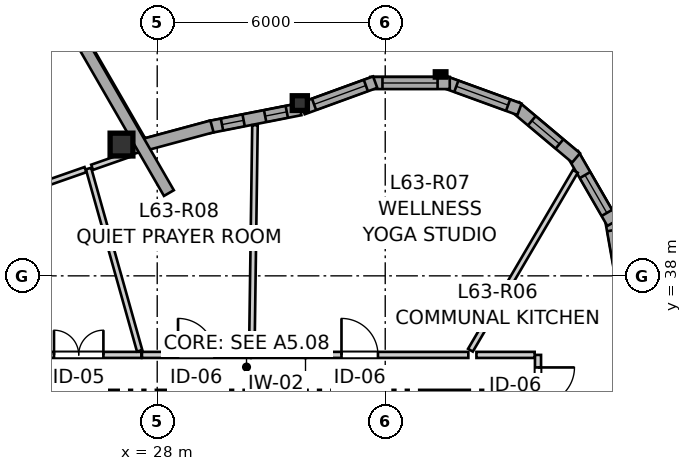
"""IFC4 building model, lengths in metres.
Left out: names, types, materials, properties, quantities, classifications, styles, units other than length and angle.
Written with IfcOpenShell. Run it as: python <this file> out.ifc"""

import sys

from ifc_helpers import new_model, si_unit, direction, frame, frame_2d, origin, origin_2d, place, context, subcontext, project, spatial, rectangle, i_section, extrude, source, transform, mapped, element, fill, save


model = new_model("IFC4")
c1 = context("Model", 3, precision=1e-05, world=origin(), true_north=direction((0.0, 1.0)))
c2 = subcontext(c1, "Body", "Model", "MODEL_VIEW")
j1 = project(units=[si_unit("LENGTHUNIT", "METRE"), si_unit("PLANEANGLEUNIT", "RADIAN")], contexts=[c1])
p1 = place(None, origin())
s1 = spatial("IfcSite", under=j1, at=p1, CompositionType="ELEMENT")
p2 = place(p1, origin())
s2 = spatial("IfcBuilding", under=s1, at=p2, CompositionType="ELEMENT")
p3 = place(p2, frame((0.0, 0.0, 211.6)))
s3 = spatial("IfcBuildingStorey", under=s2, at=p3, CompositionType="ELEMENT", Elevation=211.6)
m1 = source(origin(), c2, "Body", "SweptSolid", [
    extrude(i_section(OverallWidth=0.398, OverallDepth=0.387, WebThickness=0.019, FlangeThickness=0.03, FilletRadius=0.015, at=origin_2d()), origin(), (0.0, 0.0, 1.0), 2.96),
])
p4 = place(p3, frame((31.752, 42.545, 0.0), z_axis=(0.0, 0.0, 1.0), x_axis=(1.0, 0.0, 0.0)))
e1 = element("IfcColumn", 1, at=p4, inside=s3, PredefinedType="PILASTER", context=c2, shape_type="MappedRepresentation", body=[
    mapped(m1, transform((0.0, 0.0, 0.0), x_axis=(1.0, 0.0, 0.0), y_axis=(0.0, 1.0, 0.0), z_axis=(0.0, 0.0, 1.0), scale=1.0)),
])
m2 = source(origin(), c2, "Body", "SweptSolid", [
    extrude(rectangle(XDim=0.6, YDim=0.6, at=origin_2d()), origin(), (0.0, 0.0, 1.0), 2.96),
])
p5 = place(p3, frame((27.06, 41.454, 0.0), z_axis=(0.0, 0.0, 1.0), x_axis=(1.0, 0.0, 0.0)))
e2 = element("IfcColumn", 2, at=p5, inside=s3, PredefinedType="COLUMN", context=c2, shape_type="MappedRepresentation", body=[
    mapped(m2, transform((0.0, 0.0, 0.0), x_axis=(1.0, 0.0, 0.0), y_axis=(0.0, 1.0, 0.0), z_axis=(0.0, 0.0, 1.0), scale=1.0)),
])
p6 = place(p3, frame((40.279, 37.583, 0.0), z_axis=(0.0, 0.0, 1.0), x_axis=(-0.173671780312, 0.984803590937, 0.0)))
e3 = element("IfcWall", 3, at=p6, inside=s3, PredefinedType="SOLIDWALL", context=c2, shape_type="SweptSolid", body=[
    extrude(rectangle(XDim=1.962, YDim=0.32, at=frame_2d((0.981, 0.0))), origin(), (0.0, 0.0, 1.0), 2.58),
])
p7 = place(p6, frame((0.391, 0.0, 0.82)))
e4 = element("IfcOpeningElement", 4, at=p7, cuts=e3, PredefinedType="OPENING", context=c2, shape_type="SweptSolid", body=[
    extrude(rectangle(XDim=1.25, YDim=1.35, at=frame_2d((0.625, 0.675))), frame((0.0, 0.17, 0.0), z_axis=(0.0, -1.0, 0.0), x_axis=(1.0, 0.0, 0.0)), (0.0, 0.0, 1.0), 0.34),
])
p8 = place(p3, frame((39.983, 39.393, 0.0), z_axis=(0.0, 0.0, 1.0), x_axis=(-0.499995423472, 0.866028046028, 0.0)))
e5 = element("IfcWall", 5, at=p8, inside=s3, PredefinedType="SOLIDWALL", context=c2, shape_type="SweptSolid", body=[
    extrude(rectangle(XDim=2.09, YDim=0.32, at=frame_2d((1.045, 0.0))), origin(), (0.0, 0.0, 1.0), 2.58),
])
p9 = place(p8, frame((0.303, 0.0, 0.82)))
e6 = element("IfcOpeningElement", 6, at=p9, cuts=e5, PredefinedType="OPENING", context=c2, shape_type="SweptSolid", body=[
    extrude(rectangle(XDim=1.15, YDim=1.2, at=frame_2d((0.575, 0.6))), frame((0.0, 0.17, 0.0), z_axis=(0.0, -1.0, 0.0), x_axis=(1.0, 0.0, 0.0)), (0.0, 0.0, 1.0), 0.34),
])
p10 = place(p3, frame((39.022, 41.104, 0.0), z_axis=(0.0, 0.0, 1.0), x_axis=(-0.766072824549, 0.642753784499, 0.0)))
e7 = element("IfcWall", 7, at=p10, inside=s3, PredefinedType="SOLIDWALL", context=c2, shape_type="SweptSolid", body=[
    extrude(rectangle(XDim=2.091, YDim=0.32, at=frame_2d((1.045, 0.0))), origin(), (0.0, 0.0, 1.0), 2.58),
])
p11 = place(p10, frame((0.57, 0.0, 0.82)))
e8 = element("IfcOpeningElement", 8, at=p11, cuts=e7, PredefinedType="OPENING", context=c2, shape_type="SweptSolid", body=[
    extrude(rectangle(XDim=0.95, YDim=1.35, at=frame_2d((0.475, 0.675))), frame((0.0, 0.17, 0.0), z_axis=(0.0, -1.0, 0.0), x_axis=(1.0, 0.0, 0.0)), (0.0, 0.0, 1.0), 0.34),
])
p12 = place(p3, frame((37.533, 42.382, 0.0), z_axis=(0.0, 0.0, 1.0), x_axis=(-0.939697896412, 0.342005648315, 0.0)))
e9 = element("IfcWall", 9, at=p12, inside=s3, PredefinedType="SOLIDWALL", context=c2, shape_type="SweptSolid", body=[
    extrude(rectangle(XDim=2.09, YDim=0.32, at=frame_2d((1.045, 0.0))), origin(), (0.0, 0.0, 1.0), 2.58),
])
p13 = place(p12, frame((0.32, 0.0, 0.82)))
e10 = element("IfcOpeningElement", 10, at=p13, cuts=e9, PredefinedType="OPENING", context=c2, shape_type="SweptSolid", body=[
    extrude(rectangle(XDim=1.45, YDim=1.25, at=frame_2d((0.725, 0.625))), frame((0.0, 0.17, 0.0), z_axis=(0.0, -1.0, 0.0), x_axis=(1.0, 0.0, 0.0)), (0.0, 0.0, 1.0), 0.34),
])
p14 = place(p3, frame((35.698, 43.074, 0.0), z_axis=(0.0, 0.0, 1.0), x_axis=(-1.0, 0.0, 0.0)))
e11 = element("IfcWall", 11, at=p14, inside=s3, PredefinedType="SOLIDWALL", context=c2, shape_type="SweptSolid", body=[
    extrude(rectangle(XDim=2.09, YDim=0.32, at=frame_2d((1.045, 0.0))), origin(), (0.0, 0.0, 1.0), 2.58),
])
p15 = place(p14, frame((0.32, 0.0, 0.82)))
e12 = element("IfcOpeningElement", 12, at=p15, cuts=e11, PredefinedType="OPENING", context=c2, shape_type="SweptSolid", body=[
    extrude(rectangle(XDim=1.45, YDim=1.25, at=frame_2d((0.725, 0.625))), frame((0.0, 0.17, 0.0), z_axis=(0.0, -1.0, 0.0), x_axis=(1.0, 0.0, 0.0)), (0.0, 0.0, 1.0), 0.34),
])
p16 = place(p3, frame((33.736, 43.097, 0.0), z_axis=(0.0, 0.0, 1.0), x_axis=(-0.939691662178, -0.342022777067, 0.0)))
e13 = element("IfcWall", 13, at=p16, inside=s3, PredefinedType="SOLIDWALL", context=c2, shape_type="SweptSolid", body=[
    extrude(rectangle(XDim=2.032, YDim=0.32, at=frame_2d((1.016, 0.0))), origin(), (0.0, 0.0, 1.0), 2.58),
])
p17 = place(p16, frame((0.261, 0.0, 0.82)))
e14 = element("IfcOpeningElement", 14, at=p17, cuts=e13, PredefinedType="OPENING", context=c2, shape_type="SweptSolid", body=[
    extrude(rectangle(XDim=1.45, YDim=1.25, at=frame_2d((0.725, 0.625))), frame((0.0, 0.17, 0.0), z_axis=(0.0, -1.0, 0.0), x_axis=(1.0, 0.0, 0.0)), (0.0, 0.0, 1.0), 0.34),
])
p18 = place(p3, frame((31.764, 42.385, 0.0), z_axis=(0.0, 0.0, 1.0), x_axis=(-0.981229659911, -0.192842823335, 0.0)))
e15 = element("IfcWall", 15, at=p18, inside=s3, PredefinedType="SOLIDWALL", context=c2, shape_type="SweptSolid", body=[
    extrude(rectangle(XDim=2.454, YDim=0.32, at=frame_2d((1.227, 0.0))), origin(), (0.0, 0.0, 1.0), 2.58),
])
p19 = place(p18, frame((0.361, 0.0, 0.82)))
e16 = element("IfcOpeningElement", 16, at=p19, cuts=e15, PredefinedType="OPENING", context=c2, shape_type="SweptSolid", body=[
    extrude(rectangle(XDim=0.58, YDim=1.35, at=frame_2d((0.29, 0.675))), frame((0.0, 0.17, 0.0), z_axis=(0.0, -1.0, 0.0), x_axis=(1.0, 0.0, 0.0)), (0.0, 0.0, 1.0), 0.34),
])
p20 = place(p18, frame((1.518, 0.0, 0.82)))
e17 = element("IfcOpeningElement", 17, at=p20, cuts=e15, PredefinedType="OPENING", context=c2, shape_type="SweptSolid", body=[
    extrude(rectangle(XDim=0.58, YDim=1.35, at=frame_2d((0.29, 0.675))), frame((0.0, 0.17, 0.0), z_axis=(0.0, -1.0, 0.0), x_axis=(1.0, 0.0, 0.0)), (0.0, 0.0, 1.0), 0.34),
])
p21 = place(p3, frame((29.441, 41.931, 0.0), z_axis=(0.0, 0.0, 1.0), x_axis=(-0.965448832587, -0.260592693023, 0.0)))
e18 = element("IfcWall", 18, at=p21, inside=s3, PredefinedType="SOLIDWALL", context=c2, shape_type="SweptSolid", body=[
    extrude(rectangle(XDim=2.333, YDim=0.32, at=frame_2d((1.167, 0.0))), origin(), (0.0, 0.0, 1.0), 2.58),
])
p22 = place(p3, frame((28.307, 40.178, 0.0), z_axis=(0.0, 0.0, 1.0), x_axis=(-0.500003467681, 0.866023401709, 0.0)))
e19 = element("IfcWall", 19, at=p22, inside=s3, PredefinedType="SOLIDWALL", context=c2, shape_type="SweptSolid", body=[
    extrude(rectangle(XDim=19.929, YDim=0.3, at=frame_2d((9.964, 0.0))), origin(), (0.0, 0.0, 1.0), 2.14),
])
p23 = place(p3, frame((30.474, 35.92, 0.0), z_axis=(0.0, 0.0, 1.0), x_axis=(1.0, 0.0, 0.0)))
e20 = element("IfcWall", 20, at=p23, inside=s3, PredefinedType="PARTITIONING", context=c2, shape_type="SweptSolid", body=[
    extrude(rectangle(XDim=5.713, YDim=0.16, at=frame_2d((2.856, 0.0))), origin(), (0.0, 0.0, 1.0), 2.96),
])
p24 = place(p23, frame((2.375, 0.0, 0.0)))
e21 = element("IfcOpeningElement", 21, at=p24, cuts=e20, PredefinedType="OPENING", context=c2, shape_type="SweptSolid", body=[
    extrude(rectangle(XDim=0.96, YDim=2.1, at=frame_2d((0.48, 1.05))), frame((0.0, 0.09, 0.0), z_axis=(0.0, -1.0, 0.0), x_axis=(1.0, 0.0, 0.0)), (0.0, 0.0, 1.0), 0.18),
])
p25 = place(p3, frame((24.3, 35.92, 0.0), z_axis=(0.0, 0.0, 1.0), x_axis=(1.0, 0.0, 0.0)))
e22 = element("IfcWall", 22, at=p25, inside=s3, PredefinedType="PARTITIONING", context=c2, shape_type="SweptSolid", body=[
    extrude(rectangle(XDim=3.283, YDim=0.16, at=frame_2d((1.642, 0.0))), origin(), (0.0, 0.0, 1.0), 2.96),
])
p26 = place(p25, frame((0.984, 0.0, 0.0)))
e23 = element("IfcOpeningElement", 23, at=p26, cuts=e22, PredefinedType="OPENING", context=c2, shape_type="SweptSolid", body=[
    extrude(rectangle(XDim=1.3, YDim=2.1, at=frame_2d((0.65, 1.05))), frame((0.0, 0.09, 0.0), z_axis=(0.0, -1.0, 0.0), x_axis=(1.0, 0.0, 0.0)), (0.0, 0.0, 1.0), 0.18),
])
p27 = place(p3, frame((27.598, 35.92, 0.0), z_axis=(0.0, 0.0, 1.0), x_axis=(1.0, 0.0, 0.0)))
e24 = element("IfcWall", 24, at=p27, inside=s3, PredefinedType="PARTITIONING", context=c2, shape_type="SweptSolid", body=[
    extrude(rectangle(XDim=2.861, YDim=0.16, at=frame_2d((1.431, 0.0))), origin(), (0.0, 0.0, 1.0), 2.96),
])
p28 = place(p27, frame((0.95, 0.0, 0.0)))
e25 = element("IfcOpeningElement", 25, at=p28, cuts=e24, PredefinedType="OPENING", context=c2, shape_type="SweptSolid", body=[
    extrude(rectangle(XDim=0.96, YDim=2.1, at=frame_2d((0.48, 1.05))), frame((0.0, 0.09, 0.0), z_axis=(0.0, -1.0, 0.0), x_axis=(1.0, 0.0, 0.0)), (0.0, 0.0, 1.0), 0.18),
])
p29 = place(p3, frame((38.02, 35.92, 0.0), z_axis=(0.0, 0.0, 1.0), x_axis=(0.0, -1.0, 0.0)))
e26 = element("IfcWall", 26, at=p29, inside=s3, PredefinedType="PARTITIONING", context=c2, shape_type="SweptSolid", body=[
    extrude(rectangle(XDim=1.62, YDim=0.16, at=frame_2d((0.81, 0.0))), origin(), (0.0, 0.0, 1.0), 2.628),
])
p30 = place(p29, frame((0.33, 0.0, 0.0)))
e27 = element("IfcOpeningElement", 27, at=p30, cuts=e26, PredefinedType="OPENING", context=c2, shape_type="SweptSolid", body=[
    extrude(rectangle(XDim=0.96, YDim=2.1, at=frame_2d((0.48, 1.05))), frame((0.0, 0.09, 0.0), z_axis=(0.0, -1.0, 0.0), x_axis=(1.0, 0.0, 0.0)), (0.0, 0.0, 1.0), 0.18),
])
p31 = place(p3, frame((30.489, 36.009, 0.0), z_axis=(0.0, 0.0, 1.0), x_axis=(0.013978627514, 0.999902294213, 0.0)))
e28 = element("IfcWall", 28, at=p31, inside=s3, PredefinedType="PARTITIONING", context=c2, shape_type="SweptSolid", body=[
    extrude(rectangle(XDim=5.956, YDim=0.145, at=frame_2d((2.978, 0.0))), origin(), (0.0, 0.0, 1.0), 2.96),
])
p32 = place(p3, frame((36.242, 36.044, 0.0), z_axis=(0.0, 0.0, 1.0), x_axis=(0.50599508157, 0.862536362959, 0.0)))
e29 = element("IfcWall", 29, at=p32, inside=s3, PredefinedType="PARTITIONING", context=c2, shape_type="SweptSolid", body=[
    extrude(rectangle(XDim=5.456, YDim=0.145, at=frame_2d((2.728, 0.0))), origin(), (0.0, 0.0, 1.0), 2.96),
])
p33 = place(p3, frame((26.192, 40.823, 0.0), z_axis=(0.0, 0.0, 1.0), x_axis=(0.270218926069, -0.962798905273, 0.0)))
e30 = element("IfcWall", 30, at=p33, inside=s3, PredefinedType="PARTITIONING", context=c2, shape_type="SweptSolid", body=[
    extrude(rectangle(XDim=4.981, YDim=0.145, at=frame_2d((2.49, 0.0))), origin(), (0.0, 0.0, 1.0), 2.96),
])
p34 = place(p3, frame((38.154, 32.845, 0.0), z_axis=(0.0, 0.0, 1.0), x_axis=(0.751793032372, 0.659399148071, 0.0)))
e31 = element("IfcWall", 31, at=p34, inside=s3, PredefinedType="PARTITIONING", context=c2, shape_type="SweptSolid", body=[
    extrude(rectangle(XDim=3.631, YDim=0.145, at=frame_2d((1.815, 0.0))), origin(), (0.0, 0.0, 1.0), 2.96),
])
p35 = place(p3, frame((36.4, 35.92, 0.0), z_axis=(0.0, 0.0, 1.0), x_axis=(1.0, 0.0, 0.0)))
e32 = element("IfcWall", 32, at=p35, inside=s3, PredefinedType="PARTITIONING", context=c2, shape_type="SweptSolid", body=[
    extrude(rectangle(XDim=1.532, YDim=0.16, at=frame_2d((0.766, 0.0))), origin(), (0.0, 0.0, 1.0), 2.96),
])
p36 = place(p3, frame((24.973, 40.397, 0.0), z_axis=(0.0, 0.0, 1.0), x_axis=(0.943987684609, 0.329980683232, 0.0)))
e33 = element("IfcWall", 33, at=p36, inside=s3, PredefinedType="PARTITIONING", context=c2, shape_type="SweptSolid", body=[
    extrude(rectangle(XDim=1.206, YDim=0.145, at=frame_2d((0.603, 0.0))), origin(), (0.0, 0.0, 1.0), 2.568),
])
p37 = place(p3, frame((26.287, 40.856, 0.0), z_axis=(0.0, 0.0, 1.0), x_axis=(0.944089421658, 0.329689496214, 0.0)))
e34 = element("IfcWall", 34, at=p37, inside=s3, PredefinedType="PARTITIONING", context=c2, shape_type="SweptSolid", body=[
    extrude(rectangle(XDim=1.037, YDim=0.145, at=frame_2d((0.518, 0.0))), origin(), (0.0, 0.0, 1.0), 2.568),
])
m3 = source(origin(), c2, "Body", "SweptSolid", [
    extrude(rectangle(XDim=1.25, YDim=1.35, at=frame_2d((0.625, 0.675))), frame((0.0, 0.03, 0.0), z_axis=(0.0, -1.0, 0.0), x_axis=(1.0, 0.0, 0.0)), (0.0, 0.0, 1.0), 0.06),
])
p38 = place(p7, origin())
e35 = element("IfcWindow", 35, at=p38, inside=s3, PartitioningType="SINGLE_PANEL", PredefinedType="WINDOW", context=c2, shape_type="MappedRepresentation", body=[
    mapped(m3, transform((0.0, 0.0, 0.0), x_axis=(1.0, 0.0, 0.0), y_axis=(0.0, 1.0, 0.0), z_axis=(0.0, 0.0, 1.0), scale=1.0)),
])
fill(e4, e35)
m4 = source(origin(), c2, "Body", "SweptSolid", [
    extrude(rectangle(XDim=1.15, YDim=1.2, at=frame_2d((0.575, 0.6))), frame((0.0, 0.03, 0.0), z_axis=(0.0, -1.0, 0.0), x_axis=(1.0, 0.0, 0.0)), (0.0, 0.0, 1.0), 0.06),
])
p39 = place(p9, origin())
e36 = element("IfcWindow", 36, at=p39, inside=s3, PartitioningType="SINGLE_PANEL", PredefinedType="WINDOW", context=c2, shape_type="MappedRepresentation", body=[
    mapped(m4, transform((0.0, 0.0, 0.0), x_axis=(1.0, 0.0, 0.0), y_axis=(0.0, 1.0, 0.0), z_axis=(0.0, 0.0, 1.0), scale=1.0)),
])
fill(e6, e36)
m5 = source(origin(), c2, "Body", "SweptSolid", [
    extrude(rectangle(XDim=0.95, YDim=1.35, at=frame_2d((0.475, 0.675))), frame((0.0, 0.03, 0.0), z_axis=(0.0, -1.0, 0.0), x_axis=(1.0, 0.0, 0.0)), (0.0, 0.0, 1.0), 0.06),
])
p40 = place(p11, origin())
e37 = element("IfcWindow", 37, at=p40, inside=s3, PartitioningType="SINGLE_PANEL", PredefinedType="WINDOW", context=c2, shape_type="MappedRepresentation", body=[
    mapped(m5, transform((0.0, 0.0, 0.0), x_axis=(1.0, 0.0, 0.0), y_axis=(0.0, 1.0, 0.0), z_axis=(0.0, 0.0, 1.0), scale=1.0)),
])
fill(e8, e37)
m6 = source(origin(), c2, "Body", "SweptSolid", [
    extrude(rectangle(XDim=1.45, YDim=1.25, at=frame_2d((0.725, 0.625))), frame((0.0, 0.03, 0.0), z_axis=(0.0, -1.0, 0.0), x_axis=(1.0, 0.0, 0.0)), (0.0, 0.0, 1.0), 0.06),
])
p41 = place(p13, origin())
e38 = element("IfcWindow", 38, at=p41, inside=s3, PartitioningType="SINGLE_PANEL", PredefinedType="WINDOW", context=c2, shape_type="MappedRepresentation", body=[
    mapped(m6, transform((0.0, 0.0, 0.0), x_axis=(1.0, 0.0, 0.0), y_axis=(0.0, 1.0, 0.0), z_axis=(0.0, 0.0, 1.0), scale=1.0)),
])
fill(e10, e38)
p42 = place(p15, origin())
e39 = element("IfcWindow", 39, at=p42, inside=s3, PartitioningType="SINGLE_PANEL", PredefinedType="WINDOW", context=c2, shape_type="MappedRepresentation", body=[
    mapped(m6, transform((0.0, 0.0, 0.0), x_axis=(1.0, 0.0, 0.0), y_axis=(0.0, 1.0, 0.0), z_axis=(0.0, 0.0, 1.0), scale=1.0)),
])
fill(e12, e39)
p43 = place(p17, origin())
e40 = element("IfcWindow", 40, at=p43, inside=s3, PartitioningType="SINGLE_PANEL", PredefinedType="WINDOW", context=c2, shape_type="MappedRepresentation", body=[
    mapped(m6, transform((0.0, 0.0, 0.0), x_axis=(1.0, 0.0, 0.0), y_axis=(0.0, 1.0, 0.0), z_axis=(0.0, 0.0, 1.0), scale=1.0)),
])
fill(e14, e40)
m7 = source(origin(), c2, "Body", "SweptSolid", [
    extrude(rectangle(XDim=0.58, YDim=1.35, at=frame_2d((0.29, 0.675))), frame((0.0, 0.03, 0.0), z_axis=(0.0, -1.0, 0.0), x_axis=(1.0, 0.0, 0.0)), (0.0, 0.0, 1.0), 0.06),
])
p44 = place(p19, origin())
e41 = element("IfcWindow", 41, at=p44, inside=s3, PartitioningType="SINGLE_PANEL", PredefinedType="WINDOW", context=c2, shape_type="MappedRepresentation", body=[
    mapped(m7, transform((0.0, 0.0, 0.0), x_axis=(1.0, 0.0, 0.0), y_axis=(0.0, 1.0, 0.0), z_axis=(0.0, 0.0, 1.0), scale=1.0)),
])
fill(e16, e41)
p45 = place(p20, origin())
e42 = element("IfcWindow", 42, at=p45, inside=s3, PartitioningType="SINGLE_PANEL", PredefinedType="WINDOW", context=c2, shape_type="MappedRepresentation", body=[
    mapped(m7, transform((0.0, 0.0, 0.0), x_axis=(1.0, 0.0, 0.0), y_axis=(0.0, 1.0, 0.0), z_axis=(0.0, 0.0, 1.0), scale=1.0)),
])
fill(e17, e42)
m8 = source(origin(), c2, "Body", "SweptSolid", [
    extrude(rectangle(XDim=0.96, YDim=2.1, at=frame_2d((0.48, 1.05))), frame((0.0, 0.025, 0.0), z_axis=(0.0, -1.0, 0.0), x_axis=(1.0, 0.0, 0.0)), (0.0, 0.0, 1.0), 0.05),
])
p46 = place(p24, origin())
e43 = element("IfcDoor", 43, at=p46, inside=s3, OperationType="SINGLE_SWING_LEFT", PredefinedType="DOOR", context=c2, shape_type="MappedRepresentation", body=[
    mapped(m8, transform((0.0, 0.0, 0.0), x_axis=(1.0, 0.0, 0.0), y_axis=(0.0, 1.0, 0.0), z_axis=(0.0, 0.0, 1.0), scale=1.0)),
])
fill(e21, e43)
m9 = source(origin(), c2, "Body", "SweptSolid", [
    extrude(rectangle(XDim=1.3, YDim=2.1, at=frame_2d((0.65, 1.05))), frame((0.0, 0.025, 0.0), z_axis=(0.0, -1.0, 0.0), x_axis=(1.0, 0.0, 0.0)), (0.0, 0.0, 1.0), 0.05),
])
p47 = place(p26, origin())
e44 = element("IfcDoor", 44, at=p47, inside=s3, OperationType="DOUBLE_DOOR_SINGLE_SWING", PredefinedType="DOOR", context=c2, shape_type="MappedRepresentation", body=[
    mapped(m9, transform((0.0, 0.0, 0.0), x_axis=(1.0, 0.0, 0.0), y_axis=(0.0, 1.0, 0.0), z_axis=(0.0, 0.0, 1.0), scale=1.0)),
])
fill(e23, e44)
p48 = place(p28, origin())
e45 = element("IfcDoor", 45, at=p48, inside=s3, OperationType="SINGLE_SWING_LEFT", PredefinedType="DOOR", context=c2, shape_type="MappedRepresentation", body=[
    mapped(m8, transform((0.0, 0.0, 0.0), x_axis=(1.0, 0.0, 0.0), y_axis=(0.0, 1.0, 0.0), z_axis=(0.0, 0.0, 1.0), scale=1.0)),
])
fill(e25, e45)
p49 = place(p30, origin())
e46 = element("IfcDoor", 46, at=p49, inside=s3, OperationType="SINGLE_SWING_LEFT", PredefinedType="DOOR", context=c2, shape_type="MappedRepresentation", body=[
    mapped(m8, transform((0.0, 0.0, 0.0), x_axis=(1.0, 0.0, 0.0), y_axis=(0.0, 1.0, 0.0), z_axis=(0.0, 0.0, 1.0), scale=1.0)),
])
fill(e27, e46)
save(model, sys.argv[1])
